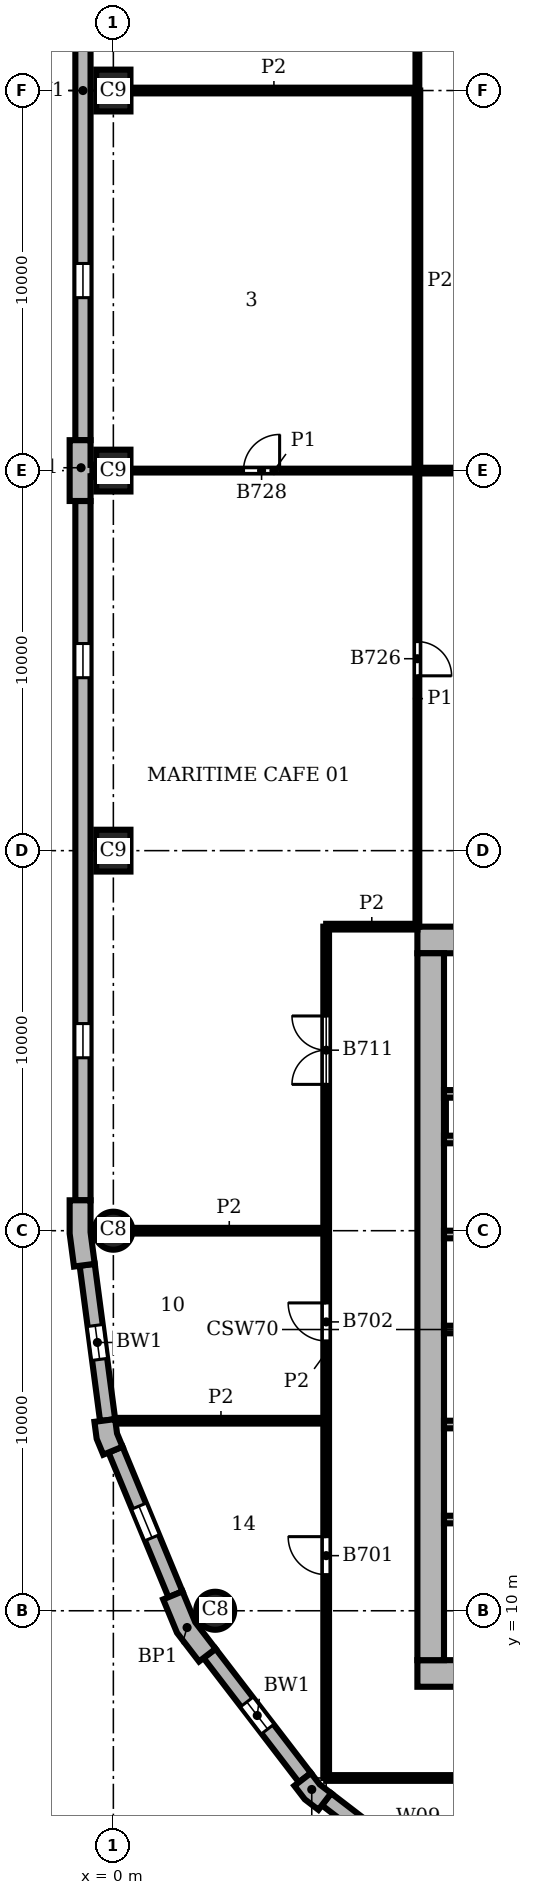
"""IFC4 building model, lengths in metres.
Left out: names, types, materials, properties, quantities, classifications, styles, units other than length and angle.
Written with IfcOpenShell. Run it as: python <this file> out.ifc"""

import sys

from ifc_helpers import new_model, si_unit, direction, frame, frame_2d, origin, origin_2d, place, context, subcontext, project, spatial, polyline, rectangle, circle, outline, extrude, element, fill, save


model = new_model("IFC4")
c1 = context("Model", 3, precision=1e-05, world=origin(), true_north=direction((0.0, 1.0)))
c2 = subcontext(c1, "Body", "Model", "MODEL_VIEW")
j1 = project(units=[si_unit("LENGTHUNIT", "METRE"), si_unit("PLANEANGLEUNIT", "RADIAN")], contexts=[c1])
p1 = place(None, origin())
s1 = spatial("IfcSite", under=j1, at=p1, CompositionType="ELEMENT")
p2 = place(p1, origin())
s2 = spatial("IfcBuilding", under=s1, at=p2, CompositionType="ELEMENT")
p3 = place(p2, frame((0.0, 0.0, 201.9)))
s3 = spatial("IfcBuildingStorey", under=s2, at=p3, CompositionType="ELEMENT", Elevation=201.9)
for number, where, z_axis, x_axis in (
    (1, (0.0, 50.0, 0.0), (0.0, 0.0, 1.0), (0.0, 1.0, 0.0)),
    (2, (0.0, 40.0, 0.0), (0.0, 0.0, 1.0), (0.0, 1.0, 0.0)),
    (3, (0.0, 30.0, 0.0), (0.0, 0.0, 1.0), (0.0, 1.0, 0.0)),
):
    element("IfcColumn", number, at=place(p3, frame(where, z_axis=z_axis, x_axis=x_axis)), inside=s3, PredefinedType="COLUMN", context=c2, shape_type="SweptSolid", body=[
        extrude(rectangle(XDim=1.1, YDim=0.9, at=origin_2d()), origin(), (0.0, 0.0, 1.0), 3.9),
    ])
for number, where, z_axis, x_axis in (
    (4, (0.0, 20.0, 0.0), (0.0, 0.0, 1.0), (1.0, 0.0, 0.0)),
    (5, (2.679, 10.0, 0.0), (0.0, 0.0, 1.0), (1.0, 0.0, 0.0)),
):
    element("IfcColumn", number, at=place(p3, frame(where, z_axis=z_axis, x_axis=x_axis)), inside=s3, PredefinedType="COLUMN", context=c2, shape_type="SweptSolid", body=[
        extrude(circle(Radius=0.5, at=origin_2d()), origin(), (0.0, 0.0, 1.0), 3.9),
    ])
for number, where, z_axis, x_axis in (
    (6, (8.0, 8.35, 0.0), (0.0, 0.0, 1.0), (1.0, 0.0, 0.0)),
    (7, (28.0, 27.65, 0.0), (0.0, 0.0, 1.0), (-1.0, 0.0, 0.0)),
):
    element("IfcWall", number, at=place(p3, frame(where, z_axis=z_axis, x_axis=x_axis)), inside=s3, PredefinedType="SHEAR", context=c2, shape_type="SweptSolid", body=[
        extrude(rectangle(XDim=20.0, YDim=0.7, at=frame_2d((10.0, 0.0))), origin(), (0.0, 0.0, 1.0), 3.9),
    ])
p4 = place(p3, frame((8.35, 27.3, 0.0), z_axis=(0.0, 0.0, 1.0), x_axis=(0.0, -1.0, 0.0)))
e8 = element("IfcWall", 8, at=p4, inside=s3, PredefinedType="SHEAR", context=c2, shape_type="SweptSolid", body=[
    extrude(rectangle(XDim=18.6, YDim=0.7, at=frame_2d((9.3, 0.0))), origin(), (0.0, 0.0, 1.0), 3.9),
])
p5 = place(p3, origin())
e9 = element("IfcWall", 9, at=p5, inside=s3, PredefinedType="SOLIDWALL", context=c2, shape_type="SweptSolid", body=[
    extrude(outline(polyline([(-0.6, 39.2), (-0.6, 39.85), (-0.55, 39.85), (-0.55, 40.15), (-0.6, 40.15), (-0.6, 40.8), (-1.0, 40.8), (-1.15, 40.8), (-1.15, 40.0), (-1.15, 39.2), (-1.0, 39.2), (-0.6, 39.2)])), origin(), (0.0, 0.0, 1.0), 3.9),
])
e10 = element("IfcWall", 10, at=p5, inside=s3, PredefinedType="SOLIDWALL", context=c2, shape_type="SweptSolid", body=[
    extrude(outline(polyline([(-1.0, 20.8), (-1.15, 20.8), (-1.15, 19.925), (-1.036, 19.057), (-0.887, 19.076), (-0.49, 19.128), (-0.6, 19.961), (-0.6, 20.8), (-1.0, 20.8)])), origin(), (0.0, 0.0, 1.0), 3.9),
])
e11 = element("IfcWall", 11, at=p5, inside=s3, PredefinedType="SOLIDWALL", context=c2, shape_type="SweptSolid", body=[
    extrude(outline(polyline([(-0.349, 14.99), (-0.498, 14.971), (-0.439, 14.523), (-0.266, 14.106), (-0.128, 14.164), (0.242, 14.317), (0.097, 14.667), (0.047, 15.043), (-0.349, 14.99)])), origin(), (0.0, 0.0, 1.0), 3.9),
])
e12 = element("IfcWall", 12, at=p5, inside=s3, PredefinedType="SOLIDWALL", context=c2, shape_type="SweptSolid", body=[
    extrude(outline(polyline([(1.449, 10.356), (1.311, 10.299), (1.675, 9.42), (2.254, 8.665), (2.373, 8.757), (2.69, 9.0), (2.155, 9.698), (1.819, 10.51), (1.449, 10.356)])), origin(), (0.0, 0.0, 1.0), 3.9),
])
e13 = element("IfcWall", 13, at=p5, inside=s3, PredefinedType="SOLIDWALL", context=c2, shape_type="SweptSolid", body=[
    extrude(outline(polyline([(4.882, 5.487), (4.763, 5.396), (5.038, 5.038), (5.396, 4.763), (5.487, 4.882), (5.731, 5.199), (5.43, 5.43), (5.199, 5.731), (4.882, 5.487)])), origin(), (0.0, 0.0, 1.0), 3.9),
])
p6 = place(p3, frame((-0.8, 59.2, 0.0), z_axis=(0.0, 0.0, 1.0), x_axis=(0.0, -1.0, 0.0)))
e14 = element("IfcWall", 14, at=p6, inside=s3, PredefinedType="SOLIDWALL", context=c2, shape_type="SweptSolid", body=[
    extrude(rectangle(XDim=18.4, YDim=0.4, at=frame_2d((9.2, 0.0))), origin(), (0.0, 0.0, 1.0), 3.9),
])
p7 = place(p6, frame((3.75, 0.0, 0.9)))
e15 = element("IfcOpeningElement", 15, at=p7, cuts=e14, PredefinedType="OPENING", context=c2, shape_type="SweptSolid", body=[
    extrude(rectangle(XDim=0.9, YDim=2.35, at=frame_2d((0.45, 1.175))), frame((0.0, 0.21, 0.0), z_axis=(0.0, -1.0, 0.0), x_axis=(1.0, 0.0, 0.0)), (0.0, 0.0, 1.0), 0.42),
])
p8 = place(p6, frame((13.75, 0.0, 0.9)))
e16 = element("IfcOpeningElement", 16, at=p8, cuts=e14, PredefinedType="OPENING", context=c2, shape_type="SweptSolid", body=[
    extrude(rectangle(XDim=0.9, YDim=2.35, at=frame_2d((0.45, 1.175))), frame((0.0, 0.21, 0.0), z_axis=(0.0, -1.0, 0.0), x_axis=(1.0, 0.0, 0.0)), (0.0, 0.0, 1.0), 0.42),
])
p9 = place(p3, frame((-0.8, 39.2, 0.0), z_axis=(0.0, 0.0, 1.0), x_axis=(0.0, -1.0, 0.0)))
e17 = element("IfcWall", 17, at=p9, inside=s3, PredefinedType="SOLIDWALL", context=c2, shape_type="SweptSolid", body=[
    extrude(rectangle(XDim=18.4, YDim=0.4, at=frame_2d((9.2, 0.0))), origin(), (0.0, 0.0, 1.0), 3.9),
])
p10 = place(p9, frame((3.75, 0.0, 0.9)))
e18 = element("IfcOpeningElement", 18, at=p10, cuts=e17, PredefinedType="OPENING", context=c2, shape_type="SweptSolid", body=[
    extrude(rectangle(XDim=0.9, YDim=2.35, at=frame_2d((0.45, 1.175))), frame((0.0, 0.21, 0.0), z_axis=(0.0, -1.0, 0.0), x_axis=(1.0, 0.0, 0.0)), (0.0, 0.0, 1.0), 0.42),
])
p11 = place(p9, frame((13.75, 0.0, 0.9)))
e19 = element("IfcOpeningElement", 19, at=p11, cuts=e17, PredefinedType="OPENING", context=c2, shape_type="SweptSolid", body=[
    extrude(rectangle(XDim=0.9, YDim=2.35, at=frame_2d((0.45, 1.175))), frame((0.0, 0.21, 0.0), z_axis=(0.0, -1.0, 0.0), x_axis=(1.0, 0.0, 0.0)), (0.0, 0.0, 1.0), 0.42),
])
p12 = place(p3, frame((-0.689, 19.102, 0.0), z_axis=(0.0, 0.0, 1.0), x_axis=(0.130514280502, -0.991446429508, 0.0)))
e20 = element("IfcWall", 20, at=p12, inside=s3, PredefinedType="SOLIDWALL", context=c2, shape_type="SweptSolid", body=[
    extrude(rectangle(XDim=4.121, YDim=0.4, at=frame_2d((2.061, 0.0))), origin(), (0.0, 0.0, 1.0), 3.9),
])
p13 = place(p12, frame((1.611, 0.0, 0.9)))
e21 = element("IfcOpeningElement", 21, at=p13, cuts=e20, PredefinedType="OPENING", context=c2, shape_type="SweptSolid", body=[
    extrude(rectangle(XDim=0.9, YDim=2.35, at=frame_2d((0.45, 1.175))), frame((0.0, 0.21, 0.0), z_axis=(0.0, -1.0, 0.0), x_axis=(1.0, 0.0, 0.0)), (0.0, 0.0, 1.0), 0.42),
])
p14 = place(p3, frame((0.057, 14.24, 0.0), z_axis=(0.0, 0.0, 1.0), x_axis=(0.382721546029, -0.923863744394, 0.0)))
e22 = element("IfcWall", 22, at=p14, inside=s3, PredefinedType="SOLIDWALL", context=c2, shape_type="SweptSolid", body=[
    extrude(rectangle(XDim=4.121, YDim=0.4, at=frame_2d((2.061, 0.0))), origin(), (0.0, 0.0, 1.0), 3.9),
])
p15 = place(p14, frame((1.611, 0.0, 0.9)))
e23 = element("IfcOpeningElement", 23, at=p15, cuts=e22, PredefinedType="OPENING", context=c2, shape_type="SweptSolid", body=[
    extrude(rectangle(XDim=0.9, YDim=2.35, at=frame_2d((0.45, 1.175))), frame((0.0, 0.21, 0.0), z_axis=(0.0, -1.0, 0.0), x_axis=(1.0, 0.0, 0.0)), (0.0, 0.0, 1.0), 0.42),
])
p16 = place(p3, frame((2.532, 8.878, 0.0), z_axis=(0.0, 0.0, 1.0), x_axis=(0.608759824817, -0.793354571229, 0.0)))
e24 = element("IfcWall", 24, at=p16, inside=s3, PredefinedType="SOLIDWALL", context=c2, shape_type="SweptSolid", body=[
    extrude(rectangle(XDim=4.121, YDim=0.4, at=frame_2d((2.061, 0.0))), origin(), (0.0, 0.0, 1.0), 3.9),
])
p17 = place(p16, frame((1.611, 0.0, 0.9)))
e25 = element("IfcOpeningElement", 25, at=p17, cuts=e24, PredefinedType="OPENING", context=c2, shape_type="SweptSolid", body=[
    extrude(rectangle(XDim=0.9, YDim=2.35, at=frame_2d((0.45, 1.175))), frame((0.0, 0.21, 0.0), z_axis=(0.0, -1.0, 0.0), x_axis=(1.0, 0.0, 0.0)), (0.0, 0.0, 1.0), 0.42),
])
p18 = place(p3, frame((5.609, 5.041, 0.0), z_axis=(0.0, 0.0, 1.0), x_axis=(0.793354571229, -0.608759824817, 0.0)))
e26 = element("IfcWall", 26, at=p18, inside=s3, PredefinedType="SOLIDWALL", context=c2, shape_type="SweptSolid", body=[
    extrude(rectangle(XDim=4.121, YDim=0.4, at=frame_2d((2.061, 0.0))), origin(), (0.0, 0.0, 1.0), 3.9),
])
p19 = place(p18, frame((1.611, 0.0, 0.9)))
e27 = element("IfcOpeningElement", 27, at=p19, cuts=e26, PredefinedType="OPENING", context=c2, shape_type="SweptSolid", body=[
    extrude(rectangle(XDim=0.9, YDim=2.35, at=frame_2d((0.45, 1.175))), frame((0.0, 0.21, 0.0), z_axis=(0.0, -1.0, 0.0), x_axis=(1.0, 0.0, 0.0)), (0.0, 0.0, 1.0), 0.42),
])
p20 = place(p3, frame((8.7, 12.4, 0.0), z_axis=(0.0, 0.0, 1.0), x_axis=(1.0, 0.0, 0.0)))
e28 = element("IfcWall", 28, at=p20, inside=s3, PredefinedType="SHEAR", context=c2, shape_type="SweptSolid", body=[
    extrude(rectangle(XDim=5.1, YDim=0.2, at=frame_2d((2.55, 0.0))), origin(), (0.0, 0.0, 1.0), 3.58),
])
for number, where, z_axis, x_axis in (
    (29, (8.7, 14.9, 0.0), (0.0, 0.0, 1.0), (1.0, 0.0, 0.0)),
    (30, (8.7, 17.4, 0.0), (0.0, 0.0, 1.0), (1.0, 0.0, 0.0)),
    (31, (8.7, 19.9, 0.0), (0.0, 0.0, 1.0), (1.0, 0.0, 0.0)),
    (32, (8.7, 22.4, 0.0), (0.0, 0.0, 1.0), (1.0, 0.0, 0.0)),
):
    element("IfcWall", number, at=place(p3, frame(where, z_axis=z_axis, x_axis=x_axis)), inside=s3, PredefinedType="SHEAR", context=c2, shape_type="SweptSolid", body=[
        extrude(rectangle(XDim=3.0, YDim=0.2, at=frame_2d((1.5, 0.0))), origin(), (0.0, 0.0, 1.0), 3.58),
    ])
p21 = place(p3, frame((8.7, 23.6, 0.0), z_axis=(0.0, 0.0, 1.0), x_axis=(1.0, 0.0, 0.0)))
e33 = element("IfcWall", 33, at=p21, inside=s3, PredefinedType="SHEAR", context=c2, shape_type="SweptSolid", body=[
    extrude(rectangle(XDim=5.1, YDim=0.2, at=frame_2d((2.55, 0.0))), origin(), (0.0, 0.0, 1.0), 3.58),
])
p22 = place(p3, frame((8.0, 28.0, 0.0), z_axis=(0.0, 0.0, 1.0), x_axis=(0.0, 1.0, 0.0)))
e34 = element("IfcWall", 34, at=p22, inside=s3, PredefinedType="PARTITIONING", context=c2, shape_type="SweptSolid", body=[
    extrude(rectangle(XDim=12.0, YDim=0.1, at=frame_2d((6.0, 0.0))), origin(), (0.0, 0.0, 1.0), 3.58),
])
p23 = place(p22, frame((6.6, 0.0, 0.0)))
e35 = element("IfcOpeningElement", 35, at=p23, cuts=e34, PredefinedType="OPENING", context=c2, shape_type="SweptSolid", body=[
    extrude(rectangle(XDim=0.9, YDim=2.1, at=frame_2d((0.45, 1.05))), frame((0.0, 0.06, 0.0), z_axis=(0.0, -1.0, 0.0), x_axis=(1.0, 0.0, 0.0)), (0.0, 0.0, 1.0), 0.12),
])
p24 = place(p3, frame((8.0, 50.0, 0.0), z_axis=(0.0, 0.0, 1.0), x_axis=(0.0, 1.0, 0.0)))
e36 = element("IfcWall", 36, at=p24, inside=s3, PredefinedType="PARTITIONING", context=c2, shape_type="SweptSolid", body=[
    extrude(rectangle(XDim=2.5, YDim=0.1, at=frame_2d((1.25, 0.0))), origin(), (0.0, 0.0, 1.0), 3.58),
])
p25 = place(p3, frame((0.45, 40.0, 0.0), z_axis=(0.0, 0.0, 1.0), x_axis=(1.0, 0.0, 0.0)))
e37 = element("IfcWall", 37, at=p25, inside=s3, PredefinedType="PARTITIONING", context=c2, shape_type="SweptSolid", body=[
    extrude(rectangle(XDim=7.55, YDim=0.1, at=frame_2d((3.775, 0.0))), origin(), (0.0, 0.0, 1.0), 3.58),
])
p26 = place(p25, frame((2.975, 0.0, 0.0)))
e38 = element("IfcOpeningElement", 38, at=p26, cuts=e37, PredefinedType="OPENING", context=c2, shape_type="SweptSolid", body=[
    extrude(rectangle(XDim=0.95, YDim=2.1, at=frame_2d((0.475, 1.05))), frame((0.0, 0.06, 0.0), z_axis=(0.0, -1.0, 0.0), x_axis=(1.0, 0.0, 0.0)), (0.0, 0.0, 1.0), 0.12),
])
p27 = place(p3, frame((5.6, 5.6, 0.0), z_axis=(0.0, 0.0, 1.0), x_axis=(0.0, 1.0, 0.0)))
e39 = element("IfcWall", 39, at=p27, inside=s3, PredefinedType="PARTITIONING", context=c2, shape_type="SweptSolid", body=[
    extrude(rectangle(XDim=22.4, YDim=0.15, at=frame_2d((11.2, 0.0))), origin(), (0.0, 0.0, 1.0), 3.58),
])
p28 = place(p27, frame((5.35, 0.0, 0.0)))
e40 = element("IfcOpeningElement", 40, at=p28, cuts=e39, PredefinedType="OPENING", context=c2, shape_type="SweptSolid", body=[
    extrude(rectangle(XDim=1.0, YDim=2.1, at=frame_2d((0.5, 1.05))), frame((0.0, 0.085, 0.0), z_axis=(0.0, -1.0, 0.0), x_axis=(1.0, 0.0, 0.0)), (0.0, 0.0, 1.0), 0.17),
])
p29 = place(p27, frame((11.5, 0.0, 0.0)))
e41 = element("IfcOpeningElement", 41, at=p29, cuts=e39, PredefinedType="OPENING", context=c2, shape_type="SweptSolid", body=[
    extrude(rectangle(XDim=1.0, YDim=2.1, at=frame_2d((0.5, 1.05))), frame((0.0, 0.085, 0.0), z_axis=(0.0, -1.0, 0.0), x_axis=(1.0, 0.0, 0.0)), (0.0, 0.0, 1.0), 0.17),
])
p30 = place(p27, frame((18.25, 0.0, 0.0)))
e42 = element("IfcOpeningElement", 42, at=p30, cuts=e39, PredefinedType="OPENING", context=c2, shape_type="SweptSolid", body=[
    extrude(rectangle(XDim=1.8, YDim=2.1, at=frame_2d((0.9, 1.05))), frame((0.0, 0.085, 0.0), z_axis=(0.0, -1.0, 0.0), x_axis=(1.0, 0.0, 0.0)), (0.0, 0.0, 1.0), 0.17),
])
p31 = place(p3, frame((8.0, 40.0, 0.0), z_axis=(0.0, 0.0, 1.0), x_axis=(0.0, 1.0, 0.0)))
e43 = element("IfcWall", 43, at=p31, inside=s3, PredefinedType="PARTITIONING", context=c2, shape_type="SweptSolid", body=[
    extrude(rectangle(XDim=10.0, YDim=0.15, at=frame_2d((5.0, 0.0))), origin(), (0.0, 0.0, 1.0), 3.58),
])
p32 = place(p3, frame((5.6, 5.6, 0.0), z_axis=(0.0, 0.0, 1.0), x_axis=(1.0, 0.0, 0.0)))
e44 = element("IfcWall", 44, at=p32, inside=s3, PredefinedType="PARTITIONING", context=c2, shape_type="SweptSolid", body=[
    extrude(rectangle(XDim=25.4, YDim=0.15, at=frame_2d((12.7, 0.0))), origin(), (0.0, 0.0, 1.0), 3.58),
])
p33 = place(p32, frame((5.35, 0.0, 0.0)))
e45 = element("IfcOpeningElement", 45, at=p33, cuts=e44, PredefinedType="OPENING", context=c2, shape_type="SweptSolid", body=[
    extrude(rectangle(XDim=1.0, YDim=2.1, at=frame_2d((0.5, 1.05))), frame((0.0, 0.085, 0.0), z_axis=(0.0, -1.0, 0.0), x_axis=(1.0, 0.0, 0.0)), (0.0, 0.0, 1.0), 0.17),
])
p34 = place(p32, frame((11.25, 0.0, 0.0)))
e46 = element("IfcOpeningElement", 46, at=p34, cuts=e44, PredefinedType="OPENING", context=c2, shape_type="SweptSolid", body=[
    extrude(rectangle(XDim=1.0, YDim=2.1, at=frame_2d((0.5, 1.05))), frame((0.0, 0.085, 0.0), z_axis=(0.0, -1.0, 0.0), x_axis=(1.0, 0.0, 0.0)), (0.0, 0.0, 1.0), 0.17),
])
p35 = place(p32, frame((18.75, 0.0, 0.0)))
e47 = element("IfcOpeningElement", 47, at=p35, cuts=e44, PredefinedType="OPENING", context=c2, shape_type="SweptSolid", body=[
    extrude(rectangle(XDim=1.0, YDim=2.1, at=frame_2d((0.5, 1.05))), frame((0.0, 0.085, 0.0), z_axis=(0.0, -1.0, 0.0), x_axis=(1.0, 0.0, 0.0)), (0.0, 0.0, 1.0), 0.17),
])
p36 = place(p3, frame((0.063, 15.0, 0.0), z_axis=(0.0, 0.0, 1.0), x_axis=(1.0, 0.0, 0.0)))
e48 = element("IfcWall", 48, at=p36, inside=s3, PredefinedType="PARTITIONING", context=c2, shape_type="SweptSolid", body=[
    extrude(rectangle(XDim=5.537, YDim=0.15, at=frame_2d((2.769, 0.0))), origin(), (0.0, 0.0, 1.0), 3.58),
])
p37 = place(p3, frame((0.5, 20.0, 0.0), z_axis=(0.0, 0.0, 1.0), x_axis=(1.0, 0.0, 0.0)))
e49 = element("IfcWall", 49, at=p37, inside=s3, PredefinedType="PARTITIONING", context=c2, shape_type="SweptSolid", body=[
    extrude(rectangle(XDim=5.1, YDim=0.15, at=frame_2d((2.55, 0.0))), origin(), (0.0, 0.0, 1.0), 3.58),
])
p38 = place(p3, frame((5.6, 28.0, 0.0), z_axis=(0.0, 0.0, 1.0), x_axis=(1.0, 0.0, 0.0)))
e50 = element("IfcWall", 50, at=p38, inside=s3, PredefinedType="PARTITIONING", context=c2, shape_type="SweptSolid", body=[
    extrude(rectangle(XDim=2.4, YDim=0.15, at=frame_2d((1.2, 0.0))), origin(), (0.0, 0.0, 1.0), 3.58),
])
p39 = place(p3, frame((8.0, 40.0, 0.0), z_axis=(0.0, 0.0, 1.0), x_axis=(1.0, 0.0, 0.0)))
e51 = element("IfcWall", 51, at=p39, inside=s3, PredefinedType="PARTITIONING", context=c2, shape_type="SweptSolid", body=[
    extrude(rectangle(XDim=1.35, YDim=0.15, at=frame_2d((0.675, 0.0))), origin(), (0.0, 0.0, 1.0), 3.58),
])
p40 = place(p3, frame((0.45, 50.0, 0.0), z_axis=(0.0, 0.0, 1.0), x_axis=(1.0, 0.0, 0.0)))
e52 = element("IfcWall", 52, at=p40, inside=s3, PredefinedType="PARTITIONING", context=c2, shape_type="SweptSolid", body=[
    extrude(rectangle(XDim=7.55, YDim=0.15, at=frame_2d((3.775, 0.0))), origin(), (0.0, 0.0, 1.0), 3.58),
])
p41 = place(p8, origin())
e53 = element("IfcWindow", 53, at=p41, inside=s3, PartitioningType="SINGLE_PANEL", PredefinedType="WINDOW", context=c2, shape_type="SweptSolid", body=[
    extrude(rectangle(XDim=0.9, YDim=2.35, at=frame_2d((0.45, 1.175))), frame((0.0, 0.16, 0.0), z_axis=(0.0, -1.0, 0.0), x_axis=(1.0, 0.0, 0.0)), (0.0, 0.0, 1.0), 0.06),
])
fill(e16, e53)
p42 = place(p10, origin())
e54 = element("IfcWindow", 54, at=p42, inside=s3, PartitioningType="SINGLE_PANEL", PredefinedType="WINDOW", context=c2, shape_type="SweptSolid", body=[
    extrude(rectangle(XDim=0.9, YDim=2.35, at=frame_2d((0.45, 1.175))), frame((0.0, 0.16, 0.0), z_axis=(0.0, -1.0, 0.0), x_axis=(1.0, 0.0, 0.0)), (0.0, 0.0, 1.0), 0.06),
])
fill(e18, e54)
p43 = place(p11, origin())
e55 = element("IfcWindow", 55, at=p43, inside=s3, PartitioningType="SINGLE_PANEL", PredefinedType="WINDOW", context=c2, shape_type="SweptSolid", body=[
    extrude(rectangle(XDim=0.9, YDim=2.35, at=frame_2d((0.45, 1.175))), frame((0.0, 0.16, 0.0), z_axis=(0.0, -1.0, 0.0), x_axis=(1.0, 0.0, 0.0)), (0.0, 0.0, 1.0), 0.06),
])
fill(e19, e55)
p44 = place(p13, origin())
e56 = element("IfcWindow", 56, at=p44, inside=s3, PartitioningType="SINGLE_PANEL", PredefinedType="WINDOW", context=c2, shape_type="SweptSolid", body=[
    extrude(rectangle(XDim=0.9, YDim=2.35, at=frame_2d((0.45, 1.175))), frame((0.0, 0.16, 0.0), z_axis=(0.0, -1.0, 0.0), x_axis=(1.0, 0.0, 0.0)), (0.0, 0.0, 1.0), 0.06),
])
fill(e21, e56)
p45 = place(p15, origin())
e57 = element("IfcWindow", 57, at=p45, inside=s3, PartitioningType="SINGLE_PANEL", PredefinedType="WINDOW", context=c2, shape_type="SweptSolid", body=[
    extrude(rectangle(XDim=0.9, YDim=2.35, at=frame_2d((0.45, 1.175))), frame((0.0, 0.16, 0.0), z_axis=(0.0, -1.0, 0.0), x_axis=(1.0, 0.0, 0.0)), (0.0, 0.0, 1.0), 0.06),
])
fill(e23, e57)
p46 = place(p17, origin())
e58 = element("IfcWindow", 58, at=p46, inside=s3, PartitioningType="SINGLE_PANEL", PredefinedType="WINDOW", context=c2, shape_type="SweptSolid", body=[
    extrude(rectangle(XDim=0.9, YDim=2.35, at=frame_2d((0.45, 1.175))), frame((0.0, 0.16, 0.0), z_axis=(0.0, -1.0, 0.0), x_axis=(1.0, 0.0, 0.0)), (0.0, 0.0, 1.0), 0.06),
])
fill(e25, e58)
p47 = place(p28, origin())
e59 = element("IfcDoor", 59, at=p47, inside=s3, OperationType="SINGLE_SWING_RIGHT", PredefinedType="DOOR", context=c2, shape_type="SweptSolid", body=[
    extrude(rectangle(XDim=1.0, YDim=2.1, at=frame_2d((0.5, 1.05))), frame((0.0, 0.025, 0.0), z_axis=(0.0, -1.0, 0.0), x_axis=(1.0, 0.0, 0.0)), (0.0, 0.0, 1.0), 0.05),
])
fill(e40, e59)
p48 = place(p29, origin())
e60 = element("IfcDoor", 60, at=p48, inside=s3, OperationType="SINGLE_SWING_RIGHT", PredefinedType="DOOR", context=c2, shape_type="SweptSolid", body=[
    extrude(rectangle(XDim=1.0, YDim=2.1, at=frame_2d((0.5, 1.05))), frame((0.0, 0.025, 0.0), z_axis=(0.0, -1.0, 0.0), x_axis=(1.0, 0.0, 0.0)), (0.0, 0.0, 1.0), 0.05),
])
fill(e41, e60)
p49 = place(p30, origin())
e61 = element("IfcDoor", 61, at=p49, inside=s3, OperationType="DOUBLE_DOOR_SINGLE_SWING", PredefinedType="DOOR", context=c2, shape_type="SweptSolid", body=[
    extrude(rectangle(XDim=1.8, YDim=2.1, at=frame_2d((0.9, 1.05))), frame((0.0, 0.025, 0.0), z_axis=(0.0, -1.0, 0.0), x_axis=(1.0, 0.0, 0.0)), (0.0, 0.0, 1.0), 0.05),
])
fill(e42, e61)
p50 = place(p23, frame((0.9, 0.0, 0.0), z_axis=(0.0, 0.0, 1.0), x_axis=(-1.0, 0.0, 0.0)))
e62 = element("IfcDoor", 62, at=p50, inside=s3, OperationType="SINGLE_SWING_RIGHT", PredefinedType="DOOR", context=c2, shape_type="SweptSolid", body=[
    extrude(rectangle(XDim=0.9, YDim=2.1, at=frame_2d((0.45, 1.05))), frame((0.0, 0.025, 0.0), z_axis=(0.0, -1.0, 0.0), x_axis=(1.0, 0.0, 0.0)), (0.0, 0.0, 1.0), 0.05),
])
fill(e35, e62)
p51 = place(p26, origin())
e63 = element("IfcDoor", 63, at=p51, inside=s3, OperationType="SINGLE_SWING_RIGHT", PredefinedType="DOOR", context=c2, shape_type="SweptSolid", body=[
    extrude(rectangle(XDim=0.95, YDim=2.1, at=frame_2d((0.475, 1.05))), frame((0.0, 0.025, 0.0), z_axis=(0.0, -1.0, 0.0), x_axis=(1.0, 0.0, 0.0)), (0.0, 0.0, 1.0), 0.05),
])
fill(e38, e63)
save(model, sys.argv[1])
